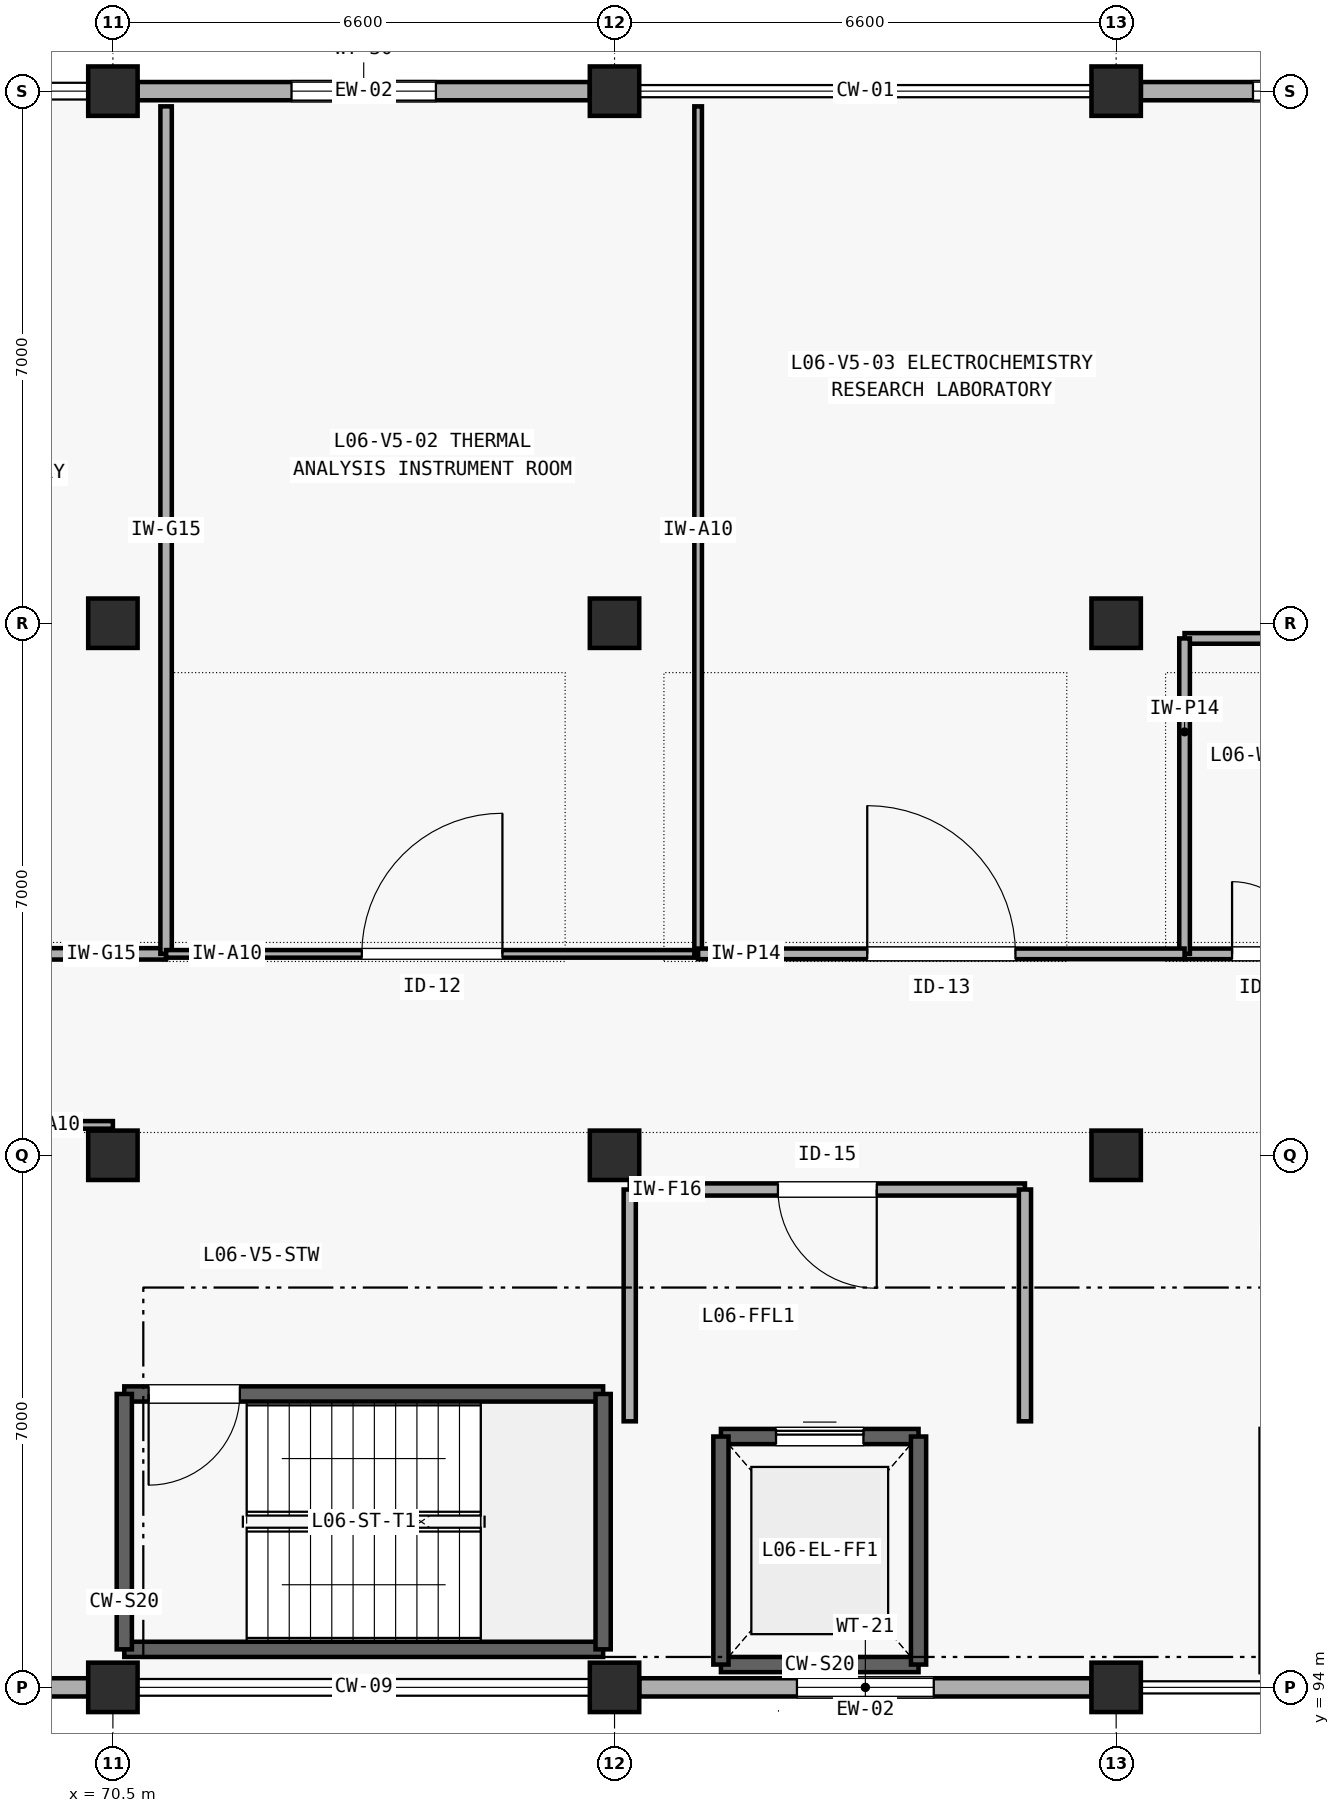
"""IFC4 building model, lengths in metres.
Left out: names, types, materials, properties, quantities, classifications, styles, units other than length and angle.
Written with IfcOpenShell. Run it as: python <this file> out.ifc"""

import sys

from ifc_helpers import new_model, si_unit, direction, frame, frame_2d, origin, origin_2d, place, context, subcontext, project, spatial, rectangle, extrude, element, fill, save


model = new_model("IFC4")
c1 = context("Model", 3, precision=1e-05, world=origin(), true_north=direction((0.0, 1.0)))
c2 = subcontext(c1, "Body", "Model", "MODEL_VIEW")
j1 = project(units=[si_unit("LENGTHUNIT", "METRE"), si_unit("PLANEANGLEUNIT", "RADIAN")], contexts=[c1])
p1 = place(None, origin())
s1 = spatial("IfcSite", under=j1, at=p1, CompositionType="ELEMENT")
p2 = place(p1, origin())
s2 = spatial("IfcBuilding", under=s1, at=p2, CompositionType="ELEMENT")
p3 = place(p2, frame((0.0, 0.0, 25.2)))
s3 = spatial("IfcBuildingStorey", under=s2, at=p3, CompositionType="ELEMENT", Elevation=25.2)
for number, where, z_axis, x_axis in (
    (1, (70.5, 94.0, 0.0), (0.0, 0.0, 1.0), (1.0, 0.0, 0.0)),
    (2, (70.5, 101.0, 0.0), (0.0, 0.0, 1.0), (1.0, 0.0, 0.0)),
    (3, (70.5, 108.0, 0.0), (0.0, 0.0, 1.0), (1.0, 0.0, 0.0)),
    (4, (70.5, 115.0, 0.0), (0.0, 0.0, 1.0), (1.0, 0.0, 0.0)),
    (5, (77.1, 94.0, 0.0), (0.0, 0.0, 1.0), (1.0, 0.0, 0.0)),
    (6, (77.1, 101.0, 0.0), (0.0, 0.0, 1.0), (1.0, 0.0, 0.0)),
    (7, (77.1, 108.0, 0.0), (0.0, 0.0, 1.0), (1.0, 0.0, 0.0)),
    (8, (77.1, 115.0, 0.0), (0.0, 0.0, 1.0), (1.0, 0.0, 0.0)),
    (9, (83.7, 94.0, 0.0), (0.0, 0.0, 1.0), (1.0, 0.0, 0.0)),
    (10, (83.7, 101.0, 0.0), (0.0, 0.0, 1.0), (1.0, 0.0, 0.0)),
    (11, (83.7, 108.0, 0.0), (0.0, 0.0, 1.0), (1.0, 0.0, 0.0)),
    (12, (83.7, 115.0, 0.0), (0.0, 0.0, 1.0), (1.0, 0.0, 0.0)),
):
    element("IfcColumn", number, at=place(p3, frame(where, z_axis=z_axis, x_axis=x_axis)), inside=s3, PredefinedType="COLUMN", context=c2, shape_type="SweptSolid", body=[
        extrude(rectangle(XDim=0.65, YDim=0.65, at=origin_2d()), origin(), (0.0, 0.0, 1.0), 4.2),
    ])
p4 = place(p3, frame((64.225, 94.0, 0.0), z_axis=(0.0, 0.0, 1.0), x_axis=(1.0, 0.0, 0.0)))
e13 = element("IfcWall", 13, at=p4, inside=s3, PredefinedType="SOLIDWALL", context=c2, shape_type="SweptSolid", body=[
    extrude(rectangle(XDim=5.95, YDim=0.24, at=frame_2d((2.975, 0.0))), origin(), (0.0, 0.0, 1.0), 3.345),
])
p5 = place(p4, frame((1.875, 0.0, 0.85)))
e14 = element("IfcOpeningElement", 14, at=p5, cuts=e13, PredefinedType="OPENING", context=c2, shape_type="SweptSolid", body=[
    extrude(rectangle(XDim=2.2, YDim=1.25, at=frame_2d((1.1, 0.625))), frame((0.0, 0.13, 0.0), z_axis=(0.0, -1.0, 0.0), x_axis=(1.0, 0.0, 0.0)), (0.0, 0.0, 1.0), 0.26),
])
p6 = place(p3, frame((77.425, 94.0, 0.0), z_axis=(0.0, 0.0, 1.0), x_axis=(1.0, 0.0, 0.0)))
e15 = element("IfcWall", 15, at=p6, inside=s3, PredefinedType="SOLIDWALL", context=c2, shape_type="SweptSolid", body=[
    extrude(rectangle(XDim=5.95, YDim=0.24, at=frame_2d((2.975, 0.0))), origin(), (0.0, 0.0, 1.0), 3.135),
])
p7 = place(p6, frame((2.075, 0.0, 0.85)))
e16 = element("IfcOpeningElement", 16, at=p7, cuts=e15, PredefinedType="OPENING", context=c2, shape_type="SweptSolid", body=[
    extrude(rectangle(XDim=1.8, YDim=1.6, at=frame_2d((0.9, 0.8))), frame((0.0, 0.13, 0.0), z_axis=(0.0, -1.0, 0.0), x_axis=(1.0, 0.0, 0.0)), (0.0, 0.0, 1.0), 0.26),
])
p8 = place(p3, frame((70.825, 115.0, 0.0), z_axis=(0.0, 0.0, 1.0), x_axis=(1.0, 0.0, 0.0)))
e17 = element("IfcWall", 17, at=p8, inside=s3, PredefinedType="SOLIDWALL", context=c2, shape_type="SweptSolid", body=[
    extrude(rectangle(XDim=5.95, YDim=0.24, at=frame_2d((2.975, 0.0))), origin(), (0.0, 0.0, 1.0), 3.345),
])
p9 = place(p8, frame((2.025, 0.0, 0.85)))
e18 = element("IfcOpeningElement", 18, at=p9, cuts=e17, PredefinedType="OPENING", context=c2, shape_type="SweptSolid", body=[
    extrude(rectangle(XDim=1.9, YDim=1.45, at=frame_2d((0.95, 0.725))), frame((0.0, 0.13, 0.0), z_axis=(0.0, -1.0, 0.0), x_axis=(1.0, 0.0, 0.0)), (0.0, 0.0, 1.0), 0.26),
])
p10 = place(p3, frame((84.025, 115.0, 0.0), z_axis=(0.0, 0.0, 1.0), x_axis=(1.0, 0.0, 0.0)))
e19 = element("IfcWall", 19, at=p10, inside=s3, PredefinedType="SOLIDWALL", context=c2, shape_type="SweptSolid", body=[
    extrude(rectangle(XDim=5.95, YDim=0.24, at=frame_2d((2.975, 0.0))), origin(), (0.0, 0.0, 1.0), 3.235),
])
p11 = place(p10, frame((1.475, 0.0, 0.85)))
e20 = element("IfcOpeningElement", 20, at=p11, cuts=e19, PredefinedType="OPENING", context=c2, shape_type="SweptSolid", body=[
    extrude(rectangle(XDim=3.0, YDim=1.2, at=frame_2d((1.5, 0.6))), frame((0.0, 0.13, 0.0), z_axis=(0.0, -1.0, 0.0), x_axis=(1.0, 0.0, 0.0)), (0.0, 0.0, 1.0), 0.26),
])
p12 = place(p3, frame((70.65, 94.5, 0.0), z_axis=(0.0, 0.0, 1.0), x_axis=(1.0, 0.0, 0.0)))
e21 = element("IfcWall", 21, at=p12, inside=s3, PredefinedType="SHEAR", context=c2, shape_type="SweptSolid", body=[
    extrude(rectangle(XDim=6.3, YDim=0.2, at=frame_2d((3.15, 0.0))), origin(), (0.0, 0.0, 1.0), 4.2),
])
p13 = place(p3, frame((70.65, 97.86, 0.0), z_axis=(0.0, 0.0, 1.0), x_axis=(1.0, 0.0, 0.0)))
e22 = element("IfcWall", 22, at=p13, inside=s3, PredefinedType="SHEAR", context=c2, shape_type="SweptSolid", body=[
    extrude(rectangle(XDim=6.3, YDim=0.2, at=frame_2d((3.15, 0.0))), origin(), (0.0, 0.0, 1.0), 4.2),
])
p14 = place(p13, frame((0.32, 0.0, 0.0)))
e23 = element("IfcOpeningElement", 23, at=p14, cuts=e22, PredefinedType="OPENING", context=c2, shape_type="SweptSolid", body=[
    extrude(rectangle(XDim=1.2, YDim=2.15, at=frame_2d((0.6, 1.075))), frame((0.0, 0.11, 0.0), z_axis=(0.0, -1.0, 0.0), x_axis=(1.0, 0.0, 0.0)), (0.0, 0.0, 1.0), 0.22),
])
for number, where, z_axis, x_axis in (
    (24, (70.65, 94.5, 0.0), (0.0, 0.0, 1.0), (0.0, 1.0, 0.0)),
    (25, (76.95, 94.5, 0.0), (0.0, 0.0, 1.0), (0.0, 1.0, 0.0)),
):
    element("IfcWall", number, at=place(p3, frame(where, z_axis=z_axis, x_axis=x_axis)), inside=s3, PredefinedType="SHEAR", context=c2, shape_type="SweptSolid", body=[
        extrude(rectangle(XDim=3.36, YDim=0.2, at=frame_2d((1.68, 0.0))), origin(), (0.0, 0.0, 1.0), 4.2),
    ])
p15 = place(p3, frame((78.5, 94.3, 0.0), z_axis=(0.0, 0.0, 1.0), x_axis=(1.0, 0.0, 0.0)))
e26 = element("IfcWall", 26, at=p15, inside=s3, PredefinedType="SHEAR", context=c2, shape_type="SweptSolid", body=[
    extrude(rectangle(XDim=2.6, YDim=0.2, at=frame_2d((1.3, 0.0))), origin(), (0.0, 0.0, 1.0), 4.2),
])
p16 = place(p3, frame((78.5, 97.3, 0.0), z_axis=(0.0, 0.0, 1.0), x_axis=(1.0, 0.0, 0.0)))
e27 = element("IfcWall", 27, at=p16, inside=s3, PredefinedType="SHEAR", context=c2, shape_type="SweptSolid", body=[
    extrude(rectangle(XDim=2.6, YDim=0.2, at=frame_2d((1.3, 0.0))), origin(), (0.0, 0.0, 1.0), 4.2),
])
p17 = place(p16, frame((0.725, 0.0, 0.0)))
e28 = element("IfcOpeningElement", 28, at=p17, cuts=e27, PredefinedType="OPENING", context=c2, shape_type="SweptSolid", body=[
    extrude(rectangle(XDim=1.15, YDim=2.2, at=frame_2d((0.575, 1.1))), frame((0.0, 0.11, 0.0), z_axis=(0.0, -1.0, 0.0), x_axis=(1.0, 0.0, 0.0)), (0.0, 0.0, 1.0), 0.22),
])
for number, where, z_axis, x_axis in (
    (29, (78.5, 94.3, 0.0), (0.0, 0.0, 1.0), (0.0, 1.0, 0.0)),
    (30, (81.1, 94.3, 0.0), (0.0, 0.0, 1.0), (0.0, 1.0, 0.0)),
):
    element("IfcWall", number, at=place(p3, frame(where, z_axis=z_axis, x_axis=x_axis)), inside=s3, PredefinedType="SHEAR", context=c2, shape_type="SweptSolid", body=[
        extrude(rectangle(XDim=3.0, YDim=0.2, at=frame_2d((1.5, 0.0))), origin(), (0.0, 0.0, 1.0), 4.2),
    ])
p18 = place(p3, frame((85.7, 94.2, 0.0), z_axis=(0.0, 0.0, 1.0), x_axis=(0.0, 1.0, 0.0)))
e31 = element("IfcWall", 31, at=p18, inside=s3, PredefinedType="SHEAR", context=c2, shape_type="SweptSolid", body=[
    extrude(rectangle(XDim=3.2, YDim=0.2, at=frame_2d((1.6, 0.0))), origin(), (0.0, 0.0, 1.0), 4.2),
])
p19 = place(p3, frame((77.3, 100.55, 0.0), z_axis=(0.0, 0.0, 1.0), x_axis=(1.0, 0.0, 0.0)))
e32 = element("IfcWall", 32, at=p19, inside=s3, PredefinedType="SOLIDWALL", context=c2, shape_type="SweptSolid", body=[
    extrude(rectangle(XDim=5.2, YDim=0.16, at=frame_2d((2.6, 0.0))), origin(), (0.0, 0.0, 1.0), 3.9),
])
p20 = place(p19, frame((1.95, 0.0, 0.0)))
e33 = element("IfcOpeningElement", 33, at=p20, cuts=e32, PredefinedType="OPENING", context=c2, shape_type="SweptSolid", body=[
    extrude(rectangle(XDim=1.3, YDim=2.15, at=frame_2d((0.65, 1.075))), frame((0.0, 0.09, 0.0), z_axis=(0.0, -1.0, 0.0), x_axis=(1.0, 0.0, 0.0)), (0.0, 0.0, 1.0), 0.18),
])
p21 = place(p3, frame((77.3, 97.5, 0.0), z_axis=(0.0, 0.0, 1.0), x_axis=(0.0, 1.0, 0.0)))
e34 = element("IfcWall", 34, at=p21, inside=s3, PredefinedType="SOLIDWALL", context=c2, shape_type="SweptSolid", body=[
    extrude(rectangle(XDim=3.05, YDim=0.16, at=frame_2d((1.525, 0.0))), origin(), (0.0, 0.0, 1.0), 3.405),
])
p22 = place(p3, frame((82.5, 97.5, 0.0), z_axis=(0.0, 0.0, 1.0), x_axis=(0.0, 1.0, 0.0)))
e35 = element("IfcWall", 35, at=p22, inside=s3, PredefinedType="SOLIDWALL", context=c2, shape_type="SweptSolid", body=[
    extrude(rectangle(XDim=3.05, YDim=0.16, at=frame_2d((1.525, 0.0))), origin(), (0.0, 0.0, 1.0), 3.9),
])
p23 = place(p3, frame((84.6, 103.65, 0.0), z_axis=(0.0, 0.0, 1.0), x_axis=(1.0, 0.0, 0.0)))
e36 = element("IfcWall", 36, at=p23, inside=s3, PredefinedType="PLUMBINGWALL", context=c2, shape_type="SweptSolid", body=[
    extrude(rectangle(XDim=2.2, YDim=0.14, at=frame_2d((1.1, 0.0))), origin(), (0.0, 0.0, 1.0), 3.9),
])
p24 = place(p23, frame((0.625, 0.0, 0.0)))
e37 = element("IfcOpeningElement", 37, at=p24, cuts=e36, PredefinedType="OPENING", context=c2, shape_type="SweptSolid", body=[
    extrude(rectangle(XDim=0.95, YDim=2.1, at=frame_2d((0.475, 1.05))), frame((0.0, 0.08, 0.0), z_axis=(0.0, -1.0, 0.0), x_axis=(1.0, 0.0, 0.0)), (0.0, 0.0, 1.0), 0.16),
])
p25 = place(p3, frame((84.6, 107.8, 0.0), z_axis=(0.0, 0.0, 1.0), x_axis=(1.0, 0.0, 0.0)))
e38 = element("IfcWall", 38, at=p25, inside=s3, PredefinedType="PLUMBINGWALL", context=c2, shape_type="SweptSolid", body=[
    extrude(rectangle(XDim=2.2, YDim=0.14, at=frame_2d((1.1, 0.0))), origin(), (0.0, 0.0, 1.0), 3.235),
])
p26 = place(p3, frame((84.6, 103.65, 0.0), z_axis=(0.0, 0.0, 1.0), x_axis=(0.0, 1.0, 0.0)))
e39 = element("IfcWall", 39, at=p26, inside=s3, PredefinedType="PLUMBINGWALL", context=c2, shape_type="SweptSolid", body=[
    extrude(rectangle(XDim=4.15, YDim=0.14, at=frame_2d((2.075, 0.0))), origin(), (0.0, 0.0, 1.0), 3.9),
])
p27 = place(p3, frame((64.1, 103.65, 0.0), z_axis=(0.0, 0.0, 1.0), x_axis=(1.0, 0.0, 0.0)))
e40 = element("IfcWall", 40, at=p27, inside=s3, PredefinedType="PARTITIONING", context=c2, shape_type="SweptSolid", body=[
    extrude(rectangle(XDim=7.1, YDim=0.15, at=frame_2d((3.55, 0.0))), origin(), (0.0, 0.0, 1.0), 3.9),
])
p28 = place(p27, frame((2.675, 0.0, 0.0)))
e41 = element("IfcOpeningElement", 41, at=p28, cuts=e40, PredefinedType="OPENING", context=c2, shape_type="SweptSolid", body=[
    extrude(rectangle(XDim=1.75, YDim=2.25, at=frame_2d((0.875, 1.125))), frame((0.0, 0.085, 0.0), z_axis=(0.0, -1.0, 0.0), x_axis=(1.0, 0.0, 0.0)), (0.0, 0.0, 1.0), 0.17),
])
p29 = place(p3, frame((71.2, 103.65, 0.0), z_axis=(0.0, 0.0, 1.0), x_axis=(0.0, 1.0, 0.0)))
e42 = element("IfcWall", 42, at=p29, inside=s3, PredefinedType="PARTITIONING", context=c2, shape_type="SweptSolid", body=[
    extrude(rectangle(XDim=11.15, YDim=0.15, at=frame_2d((5.575, 0.0))), origin(), (0.0, 0.0, 1.0), 3.9),
])
p30 = place(p3, frame((71.2, 103.65, 0.0), z_axis=(0.0, 0.0, 1.0), x_axis=(1.0, 0.0, 0.0)))
e43 = element("IfcWall", 43, at=p30, inside=s3, PredefinedType="PARTITIONING", context=c2, shape_type="SweptSolid", body=[
    extrude(rectangle(XDim=7.0, YDim=0.1, at=frame_2d((3.5, 0.0))), origin(), (0.0, 0.0, 1.0), 3.9),
])
p31 = place(p30, frame((2.575, 0.0, 0.0)))
e44 = element("IfcOpeningElement", 44, at=p31, cuts=e43, PredefinedType="OPENING", context=c2, shape_type="SweptSolid", body=[
    extrude(rectangle(XDim=1.85, YDim=2.3, at=frame_2d((0.925, 1.15))), frame((0.0, 0.06, 0.0), z_axis=(0.0, -1.0, 0.0), x_axis=(1.0, 0.0, 0.0)), (0.0, 0.0, 1.0), 0.12),
])
p32 = place(p3, frame((78.2, 103.65, 0.0), z_axis=(0.0, 0.0, 1.0), x_axis=(0.0, 1.0, 0.0)))
e45 = element("IfcWall", 45, at=p32, inside=s3, PredefinedType="PARTITIONING", context=c2, shape_type="SweptSolid", body=[
    extrude(rectangle(XDim=11.15, YDim=0.1, at=frame_2d((5.575, 0.0))), origin(), (0.0, 0.0, 1.0), 3.9),
])
p33 = place(p3, frame((78.2, 103.65, 0.0), z_axis=(0.0, 0.0, 1.0), x_axis=(1.0, 0.0, 0.0)))
e46 = element("IfcWall", 46, at=p33, inside=s3, PredefinedType="PLUMBINGWALL", context=c2, shape_type="SweptSolid", body=[
    extrude(rectangle(XDim=6.4, YDim=0.14, at=frame_2d((3.2, 0.0))), origin(), (0.0, 0.0, 1.0), 3.9),
])
p34 = place(p33, frame((2.225, 0.0, 0.0)))
e47 = element("IfcOpeningElement", 47, at=p34, cuts=e46, PredefinedType="OPENING", context=c2, shape_type="SweptSolid", body=[
    extrude(rectangle(XDim=1.95, YDim=2.3, at=frame_2d((0.975, 1.15))), frame((0.0, 0.08, 0.0), z_axis=(0.0, -1.0, 0.0), x_axis=(1.0, 0.0, 0.0)), (0.0, 0.0, 1.0), 0.16),
])
p35 = place(p3, frame((64.1, 101.4, 0.0), z_axis=(0.0, 0.0, 1.0), x_axis=(1.0, 0.0, 0.0)))
e48 = element("IfcWall", 48, at=p35, inside=s3, PredefinedType="PARTITIONING", context=c2, shape_type="SweptSolid", body=[
    extrude(rectangle(XDim=6.4, YDim=0.1, at=frame_2d((3.2, 0.0))), origin(), (0.0, 0.0, 1.0), 3.9),
])
p36 = place(p35, frame((2.75, 0.0, 0.0)))
e49 = element("IfcOpeningElement", 49, at=p36, cuts=e48, PredefinedType="OPENING", context=c2, shape_type="SweptSolid", body=[
    extrude(rectangle(XDim=0.9, YDim=2.1, at=frame_2d((0.45, 1.05))), frame((0.0, 0.06, 0.0), z_axis=(0.0, -1.0, 0.0), x_axis=(1.0, 0.0, 0.0)), (0.0, 0.0, 1.0), 0.12),
])
p37 = place(p7, origin())
e50 = element("IfcWindow", 50, at=p37, inside=s3, PartitioningType="SINGLE_PANEL", PredefinedType="WINDOW", context=c2, shape_type="SweptSolid", body=[
    extrude(rectangle(XDim=1.8, YDim=1.6, at=frame_2d((0.9, 0.8))), frame((0.0, 0.03, 0.0), z_axis=(0.0, -1.0, 0.0), x_axis=(1.0, 0.0, 0.0)), (0.0, 0.0, 1.0), 0.06),
])
fill(e16, e50)
p38 = place(p9, origin())
e51 = element("IfcWindow", 51, at=p38, inside=s3, PartitioningType="SINGLE_PANEL", PredefinedType="WINDOW", context=c2, shape_type="SweptSolid", body=[
    extrude(rectangle(XDim=1.9, YDim=1.45, at=frame_2d((0.95, 0.725))), frame((0.0, 0.03, 0.0), z_axis=(0.0, -1.0, 0.0), x_axis=(1.0, 0.0, 0.0)), (0.0, 0.0, 1.0), 0.06),
])
fill(e18, e51)
p39 = place(p11, origin())
e52 = element("IfcWindow", 52, at=p39, inside=s3, PartitioningType="SINGLE_PANEL", PredefinedType="WINDOW", context=c2, shape_type="SweptSolid", body=[
    extrude(rectangle(XDim=3.0, YDim=1.2, at=frame_2d((1.5, 0.6))), frame((0.0, 0.03, 0.0), z_axis=(0.0, -1.0, 0.0), x_axis=(1.0, 0.0, 0.0)), (0.0, 0.0, 1.0), 0.06),
])
fill(e20, e52)
p40 = place(p14, frame((1.2, 0.0, 0.0), z_axis=(0.0, 0.0, 1.0), x_axis=(-1.0, 0.0, 0.0)))
e53 = element("IfcDoor", 53, at=p40, inside=s3, OperationType="SINGLE_SWING_RIGHT", PredefinedType="DOOR", context=c2, shape_type="SweptSolid", body=[
    extrude(rectangle(XDim=1.2, YDim=2.15, at=frame_2d((0.6, 1.075))), frame((0.0, 0.025, 0.0), z_axis=(0.0, -1.0, 0.0), x_axis=(1.0, 0.0, 0.0)), (0.0, 0.0, 1.0), 0.05),
])
fill(e23, e53)
p41 = place(p17, origin())
e54 = element("IfcDoor", 54, at=p41, inside=s3, OperationType="SLIDING_TO_LEFT", PredefinedType="DOOR", context=c2, shape_type="SweptSolid", body=[
    extrude(rectangle(XDim=1.15, YDim=2.2, at=frame_2d((0.575, 1.1))), frame((0.0, 0.025, 0.0), z_axis=(0.0, -1.0, 0.0), x_axis=(1.0, 0.0, 0.0)), (0.0, 0.0, 1.0), 0.05),
])
fill(e28, e54)
p42 = place(p20, frame((1.3, 0.0, 0.0), z_axis=(0.0, 0.0, 1.0), x_axis=(-1.0, 0.0, 0.0)))
e55 = element("IfcDoor", 55, at=p42, inside=s3, OperationType="SINGLE_SWING_LEFT", PredefinedType="DOOR", context=c2, shape_type="SweptSolid", body=[
    extrude(rectangle(XDim=1.3, YDim=2.15, at=frame_2d((0.65, 1.075))), frame((0.0, 0.025, 0.0), z_axis=(0.0, -1.0, 0.0), x_axis=(1.0, 0.0, 0.0)), (0.0, 0.0, 1.0), 0.05),
])
fill(e33, e55)
p43 = place(p24, origin())
e56 = element("IfcDoor", 56, at=p43, inside=s3, OperationType="SINGLE_SWING_LEFT", PredefinedType="DOOR", context=c2, shape_type="SweptSolid", body=[
    extrude(rectangle(XDim=0.95, YDim=2.1, at=frame_2d((0.475, 1.05))), frame((0.0, 0.025, 0.0), z_axis=(0.0, -1.0, 0.0), x_axis=(1.0, 0.0, 0.0)), (0.0, 0.0, 1.0), 0.05),
])
fill(e37, e56)
p44 = place(p31, origin())
e57 = element("IfcDoor", 57, at=p44, inside=s3, OperationType="SINGLE_SWING_RIGHT", PredefinedType="DOOR", context=c2, shape_type="SweptSolid", body=[
    extrude(rectangle(XDim=1.85, YDim=2.3, at=frame_2d((0.925, 1.15))), frame((0.0, 0.025, 0.0), z_axis=(0.0, -1.0, 0.0), x_axis=(1.0, 0.0, 0.0)), (0.0, 0.0, 1.0), 0.05),
])
fill(e44, e57)
p45 = place(p34, origin())
e58 = element("IfcDoor", 58, at=p45, inside=s3, OperationType="SINGLE_SWING_LEFT", PredefinedType="DOOR", context=c2, shape_type="SweptSolid", body=[
    extrude(rectangle(XDim=1.95, YDim=2.3, at=frame_2d((0.975, 1.15))), frame((0.0, 0.025, 0.0), z_axis=(0.0, -1.0, 0.0), x_axis=(1.0, 0.0, 0.0)), (0.0, 0.0, 1.0), 0.05),
])
fill(e47, e58)
save(model, sys.argv[1])
